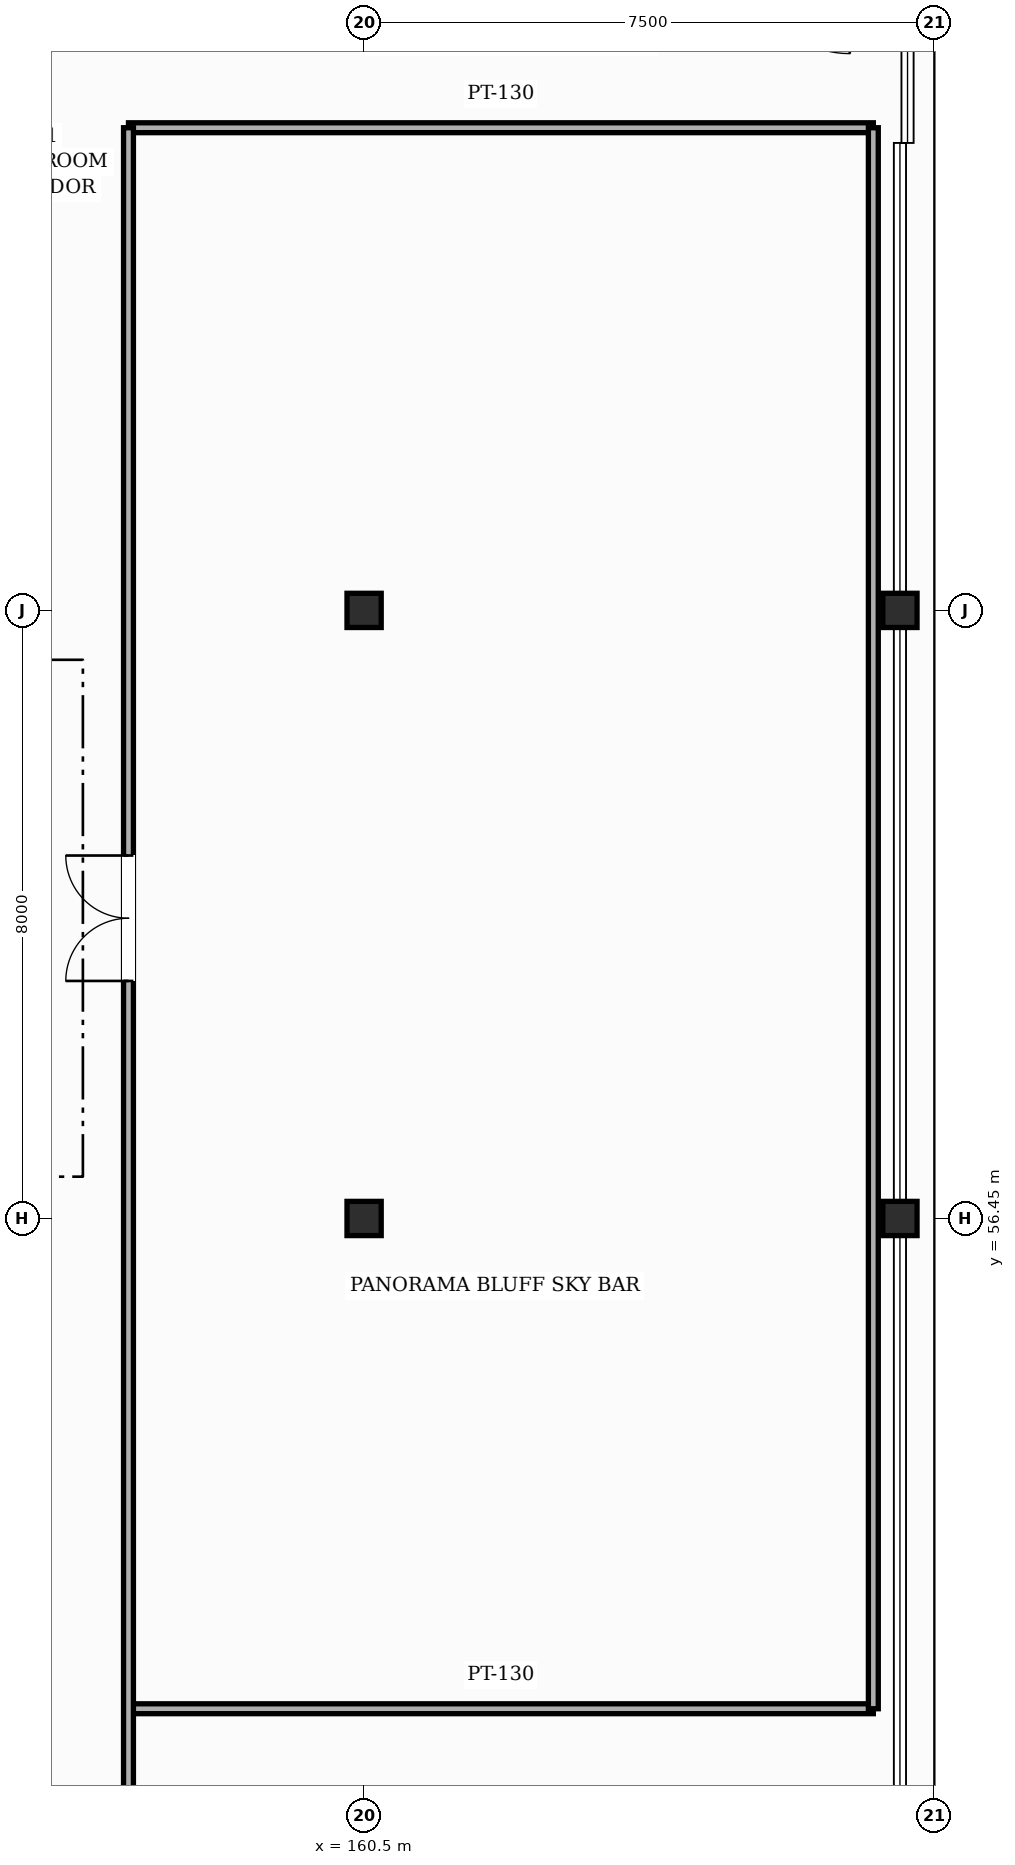
"""IFC4 building model, lengths in metres.
Left out: names, types, materials, properties, quantities, classifications, styles, units other than length and angle.
Written with IfcOpenShell. Run it as: python <this file> out.ifc"""

import sys

from ifc_helpers import new_model, si_unit, direction, frame, frame_2d, origin, origin_2d, place, context, subcontext, project, spatial, rectangle, hollow_rectangle, extrude, element, fill, save


model = new_model("IFC4")
c1 = context("Model", 3, precision=1e-05, world=origin(), true_north=direction((0.0, 1.0)))
c2 = subcontext(c1, "Body", "Model", "MODEL_VIEW")
j1 = project(units=[si_unit("LENGTHUNIT", "METRE"), si_unit("PLANEANGLEUNIT", "RADIAN")], contexts=[c1])
p1 = place(None, origin())
s1 = spatial("IfcSite", under=j1, at=p1, CompositionType="ELEMENT")
p2 = place(p1, origin())
s2 = spatial("IfcBuilding", under=s1, at=p2, CompositionType="ELEMENT")
p3 = place(p2, frame((0.0, 0.0, 46.2)))
s3 = spatial("IfcBuildingStorey", under=s2, at=p3, CompositionType="ELEMENT", Elevation=46.2)
for number, where, z_axis, x_axis in (
    (1, (160.5, 56.45, 0.0), (0.0, 0.0, 1.0), (1.0, 0.0, 0.0)),
    (2, (160.5, 64.45, 0.0), (0.0, 0.0, 1.0), (1.0, 0.0, 0.0)),
    (3, (167.55, 56.45, 0.0), (0.0, 0.0, 1.0), (1.0, 0.0, 0.0)),
    (4, (167.55, 64.45, 0.0), (0.0, 0.0, 1.0), (1.0, 0.0, 0.0)),
):
    element("IfcColumn", number, at=place(p3, frame(where, z_axis=z_axis, x_axis=x_axis)), inside=s3, PredefinedType="COLUMN", context=c2, shape_type="SweptSolid", body=[
        extrude(hollow_rectangle(XDim=0.45, YDim=0.45, WallThickness=0.019, InnerFilletRadius=0.019, OuterFilletRadius=0.038, at=origin_2d()), origin(), (0.0, 0.0, 1.0), 3.99),
    ])
for number, where, z_axis, x_axis in (
    (5, (157.4, 50.0, 0.0), (0.0, 0.0, 1.0), (1.0, 0.0, 0.0)),
    (6, (157.4, 70.8, 0.0), (0.0, 0.0, 1.0), (1.0, 0.0, 0.0)),
):
    element("IfcWall", number, at=place(p3, frame(where, z_axis=z_axis, x_axis=x_axis)), inside=s3, PredefinedType="PARTITIONING", context=c2, shape_type="SweptSolid", body=[
        extrude(rectangle(XDim=9.8, YDim=0.13, at=frame_2d((4.9, 0.0))), origin(), (0.0, 0.0, 1.0), 3.935),
    ])
p4 = place(p3, frame((157.4, 22.6, 0.0), z_axis=(0.0, 0.0, 1.0), x_axis=(0.0, 1.0, 0.0)))
e7 = element("IfcWall", 7, at=p4, inside=s3, PredefinedType="PARTITIONING", context=c2, shape_type="SweptSolid", body=[
    extrude(rectangle(XDim=48.2, YDim=0.13, at=frame_2d((24.1, 0.0))), origin(), (0.0, 0.0, 1.0), 3.935),
])
p5 = place(p4, frame((12.675, 0.0, 0.0)))
e8 = element("IfcOpeningElement", 8, at=p5, cuts=e7, PredefinedType="OPENING", context=c2, shape_type="SweptSolid", body=[
    extrude(rectangle(XDim=2.05, YDim=2.45, at=frame_2d((1.025, 1.225))), frame((0.0, 0.075, 0.0), z_axis=(0.0, -1.0, 0.0), x_axis=(1.0, 0.0, 0.0)), (0.0, 0.0, 1.0), 0.15),
])
p6 = place(p4, frame((36.975, 0.0, 0.0)))
e9 = element("IfcOpeningElement", 9, at=p6, cuts=e7, PredefinedType="OPENING", context=c2, shape_type="SweptSolid", body=[
    extrude(rectangle(XDim=1.65, YDim=2.35, at=frame_2d((0.825, 1.175))), frame((0.0, 0.075, 0.0), z_axis=(0.0, -1.0, 0.0), x_axis=(1.0, 0.0, 0.0)), (0.0, 0.0, 1.0), 0.15),
])
p7 = place(p3, frame((167.2, 50.0, 0.0), z_axis=(0.0, 0.0, 1.0), x_axis=(0.0, 1.0, 0.0)))
e10 = element("IfcWall", 10, at=p7, inside=s3, PredefinedType="PARTITIONING", context=c2, shape_type="SweptSolid", body=[
    extrude(rectangle(XDim=20.8, YDim=0.13, at=frame_2d((10.4, 0.0))), origin(), (0.0, 0.0, 1.0), 3.935),
])
p8 = place(p6, origin())
e11 = element("IfcDoor", 11, at=p8, inside=s3, OperationType="DOUBLE_DOOR_SINGLE_SWING", PredefinedType="DOOR", context=c2, shape_type="SweptSolid", body=[
    extrude(rectangle(XDim=1.65, YDim=2.35, at=frame_2d((0.825, 1.175))), frame((0.0, 0.025, 0.0), z_axis=(0.0, -1.0, 0.0), x_axis=(1.0, 0.0, 0.0)), (0.0, 0.0, 1.0), 0.05),
])
fill(e9, e11)
save(model, sys.argv[1])
